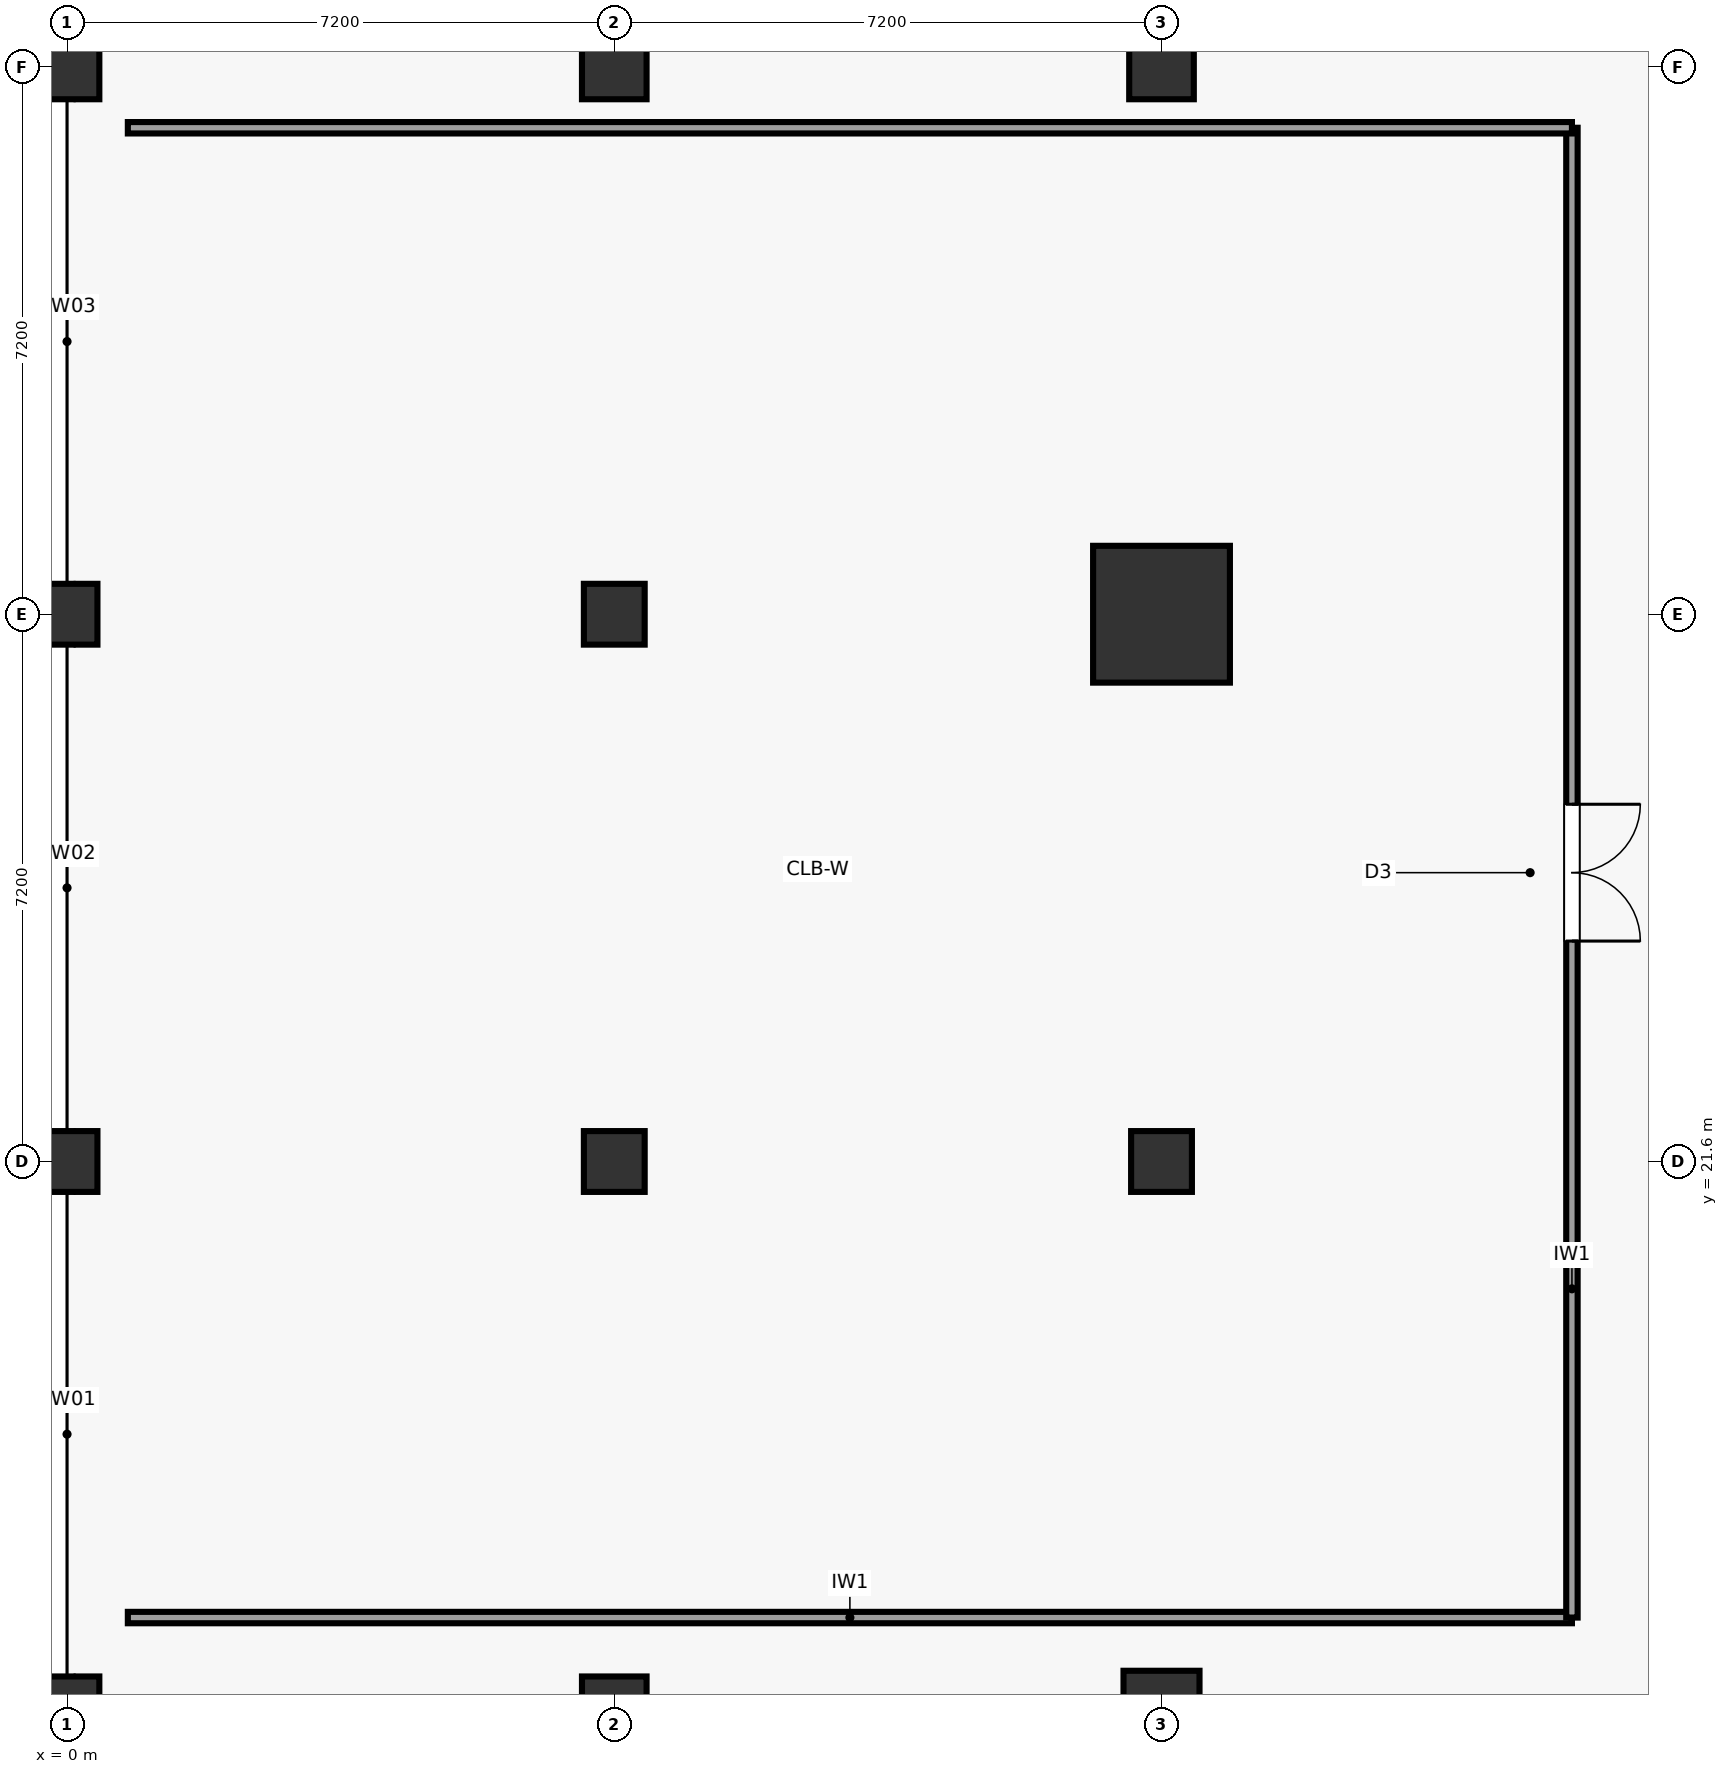
"""IFC4 building model, lengths in metres.
Left out: names, types, materials, properties, quantities, classifications, styles, units other than length and angle.
Written with IfcOpenShell. Run it as: python <this file> out.ifc"""

import sys

from ifc_helpers import new_model, si_unit, direction, frame, frame_2d, origin, origin_2d, place, context, subcontext, project, spatial, rectangle, circle, extrude, element, fill, save


model = new_model("IFC4")
c1 = context("Model", 3, precision=1e-05, world=origin(), true_north=direction((0.0, 1.0)))
c2 = subcontext(c1, "Body", "Model", "MODEL_VIEW")
j1 = project(units=[si_unit("LENGTHUNIT", "METRE"), si_unit("PLANEANGLEUNIT", "RADIAN")], contexts=[c1])
p1 = place(None, origin())
s1 = spatial("IfcSite", under=j1, at=p1, CompositionType="ELEMENT")
p2 = place(p1, origin())
s2 = spatial("IfcBuilding", under=s1, at=p2, CompositionType="ELEMENT")
p3 = place(p2, frame((0.0, 0.0, 5.4)))
s3 = spatial("IfcBuildingStorey", under=s2, at=p3, CompositionType="ELEMENT", Elevation=5.4)
p4 = place(p3, frame((0.0, 14.4, 0.0), z_axis=(0.0, 0.0, 1.0), x_axis=(1.0, 0.0, 0.0)))
e1 = element("IfcColumn", 1, at=p4, inside=s3, PredefinedType="COLUMN", context=c2, shape_type="SweptSolid", body=[
    extrude(rectangle(XDim=0.85, YDim=0.85, at=origin_2d()), origin(), (0.0, 0.0, 1.0), 4.2),
])
p5 = place(p3, frame((0.0, 21.6, 0.0), z_axis=(0.0, 0.0, 1.0), x_axis=(1.0, 0.0, 0.0)))
e2 = element("IfcColumn", 2, at=p5, inside=s3, PredefinedType="COLUMN", context=c2, shape_type="SweptSolid", body=[
    extrude(rectangle(XDim=0.8, YDim=0.8, at=origin_2d()), origin(), (0.0, 0.0, 1.0), 4.2),
])
p6 = place(p3, frame((0.0, 28.8, 0.0), z_axis=(0.0, 0.0, 1.0), x_axis=(1.0, 0.0, 0.0)))
e3 = element("IfcColumn", 3, at=p6, inside=s3, PredefinedType="COLUMN", context=c2, shape_type="SweptSolid", body=[
    extrude(circle(Radius=0.4, at=origin_2d()), origin(), (0.0, 0.0, 1.0), 4.2),
])
for number, where, z_axis, x_axis in (
    (4, (0.0, 36.0, 0.0), (0.0, 0.0, 1.0), (1.0, 0.0, 0.0)),
    (5, (7.2, 14.4, 0.0), (0.0, 0.0, 1.0), (1.0, 0.0, 0.0)),
):
    element("IfcColumn", number, at=place(p3, frame(where, z_axis=z_axis, x_axis=x_axis)), inside=s3, PredefinedType="COLUMN", context=c2, shape_type="SweptSolid", body=[
        extrude(rectangle(XDim=0.85, YDim=0.85, at=origin_2d()), origin(), (0.0, 0.0, 1.0), 4.2),
    ])
p7 = place(p3, frame((7.2, 21.6, 0.0), z_axis=(0.0, 0.0, 1.0), x_axis=(1.0, 0.0, 0.0)))
e6 = element("IfcColumn", 6, at=p7, inside=s3, PredefinedType="COLUMN", context=c2, shape_type="SweptSolid", body=[
    extrude(rectangle(XDim=0.8, YDim=0.8, at=origin_2d()), origin(), (0.0, 0.0, 1.0), 4.2),
])
p8 = place(p3, frame((7.2, 28.8, 0.0), z_axis=(0.0, 0.0, 1.0), x_axis=(1.0, 0.0, 0.0)))
e7 = element("IfcColumn", 7, at=p8, inside=s3, PredefinedType="COLUMN", context=c2, shape_type="SweptSolid", body=[
    extrude(circle(Radius=0.4, at=origin_2d()), origin(), (0.0, 0.0, 1.0), 4.2),
])
p9 = place(p3, frame((7.2, 36.0, 0.0), z_axis=(0.0, 0.0, 1.0), x_axis=(1.0, 0.0, 0.0)))
e8 = element("IfcColumn", 8, at=p9, inside=s3, PredefinedType="COLUMN", context=c2, shape_type="SweptSolid", body=[
    extrude(rectangle(XDim=0.85, YDim=0.85, at=origin_2d()), origin(), (0.0, 0.0, 1.0), 4.2),
])
p10 = place(p3, frame((14.4, 14.4, 0.0), z_axis=(0.0, 0.0, 1.0), x_axis=(1.0, 0.0, 0.0)))
e9 = element("IfcColumn", 9, at=p10, inside=s3, PredefinedType="COLUMN", context=c2, shape_type="SweptSolid", body=[
    extrude(circle(Radius=0.5, at=origin_2d()), origin(), (0.0, 0.0, 1.0), 4.2),
])
p11 = place(p3, frame((14.4, 21.6, 0.0), z_axis=(0.0, 0.0, 1.0), x_axis=(1.0, 0.0, 0.0)))
e10 = element("IfcColumn", 10, at=p11, inside=s3, PredefinedType="COLUMN", context=c2, shape_type="SweptSolid", body=[
    extrude(rectangle(XDim=0.8, YDim=0.8, at=origin_2d()), origin(), (0.0, 0.0, 1.0), 4.2),
])
p12 = place(p3, frame((14.4, 28.8, 0.0), z_axis=(0.0, 0.0, 1.0), x_axis=(1.0, 0.0, 0.0)))
e11 = element("IfcColumn", 11, at=p12, inside=s3, PredefinedType="COLUMN", context=c2, shape_type="SweptSolid", body=[
    extrude(circle(Radius=0.9, at=origin_2d()), origin(), (0.0, 0.0, 1.0), 4.2),
])
p13 = place(p3, frame((14.4, 36.0, 0.0), z_axis=(0.0, 0.0, 1.0), x_axis=(1.0, 0.0, 0.0)))
e12 = element("IfcColumn", 12, at=p13, inside=s3, PredefinedType="COLUMN", context=c2, shape_type="SweptSolid", body=[
    extrude(rectangle(XDim=0.85, YDim=0.85, at=origin_2d()), origin(), (0.0, 0.0, 1.0), 4.2),
])
p14 = place(p3, frame((0.8, 15.6, 0.0), z_axis=(0.0, 0.0, 1.0), x_axis=(1.0, 0.0, 0.0)))
e13 = element("IfcWall", 13, at=p14, inside=s3, PredefinedType="PARTITIONING", context=c2, shape_type="SweptSolid", body=[
    extrude(rectangle(XDim=19.0, YDim=0.15, at=frame_2d((9.5, 0.0))), origin(), (0.0, 0.0, 1.0), 2.98),
])
p15 = place(p3, frame((19.8, 15.6, 0.0), z_axis=(0.0, 0.0, 1.0), x_axis=(0.0, 1.0, 0.0)))
e14 = element("IfcWall", 14, at=p15, inside=s3, PredefinedType="PARTITIONING", context=c2, shape_type="SweptSolid", body=[
    extrude(rectangle(XDim=19.6, YDim=0.15, at=frame_2d((9.8, 0.0))), origin(), (0.0, 0.0, 1.0), 2.98),
])
p16 = place(p15, frame((8.9, 0.0, 0.0)))
e15 = element("IfcOpeningElement", 15, at=p16, cuts=e14, PredefinedType="OPENING", context=c2, shape_type="SweptSolid", body=[
    extrude(rectangle(XDim=1.8, YDim=2.3, at=frame_2d((0.9, 1.15))), frame((0.0, 0.085, 0.0), z_axis=(0.0, -1.0, 0.0), x_axis=(1.0, 0.0, 0.0)), (0.0, 0.0, 1.0), 0.17),
])
p17 = place(p3, frame((19.8, 35.2, 0.0), z_axis=(0.0, 0.0, 1.0), x_axis=(-1.0, 0.0, 0.0)))
e16 = element("IfcWall", 16, at=p17, inside=s3, PredefinedType="PARTITIONING", context=c2, shape_type="SweptSolid", body=[
    extrude(rectangle(XDim=19.0, YDim=0.15, at=frame_2d((9.5, 0.0))), origin(), (0.0, 0.0, 1.0), 2.98),
])
p18 = place(p16, frame((1.8, 0.0, 0.0), z_axis=(0.0, 0.0, 1.0), x_axis=(-1.0, 0.0, 0.0)))
e17 = element("IfcDoor", 17, at=p18, inside=s3, OperationType="DOUBLE_DOOR_SINGLE_SWING", PredefinedType="DOOR", context=c2, shape_type="SweptSolid", body=[
    extrude(rectangle(XDim=1.8, YDim=2.3, at=frame_2d((0.9, 1.15))), frame((0.0, 0.025, 0.0), z_axis=(0.0, -1.0, 0.0), x_axis=(1.0, 0.0, 0.0)), (0.0, 0.0, 1.0), 0.05),
])
fill(e15, e17)
save(model, sys.argv[1])
